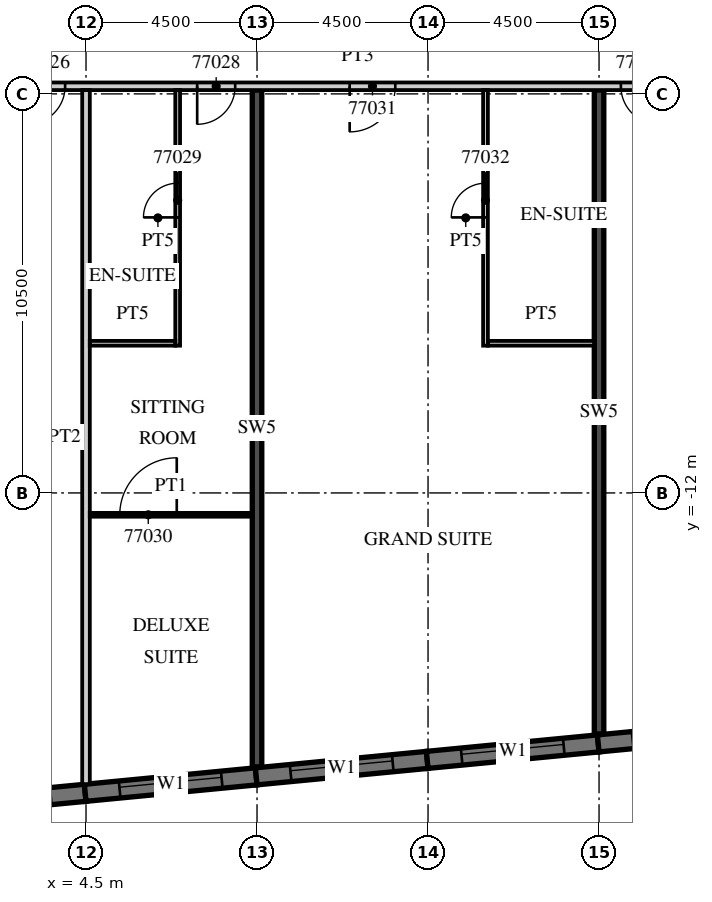
"""IFC4 building model, lengths in metres.
Left out: names, types, materials, properties, quantities, classifications, styles, units other than length and angle.
Written with IfcOpenShell. Run it as: python <this file> out.ifc"""

import sys

from ifc_helpers import new_model, si_unit, direction, frame, frame_2d, origin, place, context, subcontext, project, spatial, rectangle, extrude, element, fill, save


model = new_model("IFC4")
c1 = context("Model", 3, precision=1e-05, world=origin(), true_north=direction((0.0, 1.0)))
c2 = subcontext(c1, "Body", "Model", "MODEL_VIEW")
j1 = project(units=[si_unit("LENGTHUNIT", "METRE"), si_unit("PLANEANGLEUNIT", "RADIAN")], contexts=[c1])
p1 = place(None, origin())
s1 = spatial("IfcSite", under=j1, at=p1, CompositionType="ELEMENT")
p2 = place(p1, origin())
s2 = spatial("IfcBuilding", under=s1, at=p2, CompositionType="ELEMENT")
p3 = place(p2, frame((0.0, 0.0, 304.8)))
s3 = spatial("IfcBuildingStorey", under=s2, at=p3, CompositionType="ELEMENT", Elevation=304.8)
p4 = place(p3, frame((9.0, -19.207, 0.0), z_axis=(0.0, 0.0, 1.0), x_axis=(0.0, 1.0, 0.0)))
e1 = element("IfcWall", 1, at=p4, inside=s3, PredefinedType="SHEAR", context=c2, shape_type="SweptSolid", body=[
    extrude(rectangle(XDim=17.807, YDim=0.25, at=frame_2d((8.904, 0.0))), origin(), (0.0, 0.0, 1.0), 3.3),
])
p5 = place(p3, frame((18.0, -18.341, 0.0), z_axis=(0.0, 0.0, 1.0), x_axis=(0.0, 1.0, 0.0)))
e2 = element("IfcWall", 2, at=p5, inside=s3, PredefinedType="SHEAR", context=c2, shape_type="SweptSolid", body=[
    extrude(rectangle(XDim=16.941, YDim=0.25, at=frame_2d((8.47, 0.0))), origin(), (0.0, 0.0, 1.0), 3.3),
])
p6 = place(p3, frame((-0.021, -20.324, 0.0), z_axis=(0.0, 0.0, 1.0), x_axis=(0.995400317863, 0.09580296028, 0.0)))
e3 = element("IfcWall", 3, at=p6, inside=s3, PredefinedType="SOLIDWALL", context=c2, shape_type="SweptSolid", body=[
    extrude(rectangle(XDim=4.521, YDim=0.45, at=frame_2d((2.26, 0.0))), origin(), (0.0, 0.0, 1.0), 2.9),
])
p7 = place(p6, frame((0.91, 0.0, 0.45)))
e4 = element("IfcOpeningElement", 4, at=p7, cuts=e3, PredefinedType="OPENING", context=c2, shape_type="SweptSolid", body=[
    extrude(rectangle(XDim=2.7, YDim=2.25, at=frame_2d((1.35, 1.125))), frame((0.0, 0.235, 0.0), z_axis=(0.0, -1.0, 0.0), x_axis=(1.0, 0.0, 0.0)), (0.0, 0.0, 1.0), 0.47),
])
p8 = place(p3, frame((4.479, -19.891, 0.0), z_axis=(0.0, 0.0, 1.0), x_axis=(0.995394670263, 0.095861621166, 0.0)))
e5 = element("IfcWall", 5, at=p8, inside=s3, PredefinedType="SOLIDWALL", context=c2, shape_type="SweptSolid", body=[
    extrude(rectangle(XDim=4.521, YDim=0.45, at=frame_2d((2.26, 0.0))), origin(), (0.0, 0.0, 1.0), 2.9),
])
p9 = place(p8, frame((0.91, 0.0, 0.45)))
e6 = element("IfcOpeningElement", 6, at=p9, cuts=e5, PredefinedType="OPENING", context=c2, shape_type="SweptSolid", body=[
    extrude(rectangle(XDim=2.7, YDim=2.25, at=frame_2d((1.35, 1.125))), frame((0.0, 0.235, 0.0), z_axis=(0.0, -1.0, 0.0), x_axis=(1.0, 0.0, 0.0)), (0.0, 0.0, 1.0), 0.47),
])
p10 = place(p3, frame((8.978, -19.458, 0.0), z_axis=(0.0, 0.0, 1.0), x_axis=(0.995395166513, 0.095856468129, 0.0)))
e7 = element("IfcWall", 7, at=p10, inside=s3, PredefinedType="SOLIDWALL", context=c2, shape_type="SweptSolid", body=[
    extrude(rectangle(XDim=4.521, YDim=0.45, at=frame_2d((2.26, 0.0))), origin(), (0.0, 0.0, 1.0), 2.9),
])
p11 = place(p10, frame((0.91, 0.0, 0.45)))
e8 = element("IfcOpeningElement", 8, at=p11, cuts=e7, PredefinedType="OPENING", context=c2, shape_type="SweptSolid", body=[
    extrude(rectangle(XDim=2.7, YDim=2.25, at=frame_2d((1.35, 1.125))), frame((0.0, 0.235, 0.0), z_axis=(0.0, -1.0, 0.0), x_axis=(1.0, 0.0, 0.0)), (0.0, 0.0, 1.0), 0.47),
])
p12 = place(p3, frame((13.478, -19.024, 0.0), z_axis=(0.0, 0.0, 1.0), x_axis=(0.995395662684, 0.095851315644, 0.0)))
e9 = element("IfcWall", 9, at=p12, inside=s3, PredefinedType="SOLIDWALL", context=c2, shape_type="SweptSolid", body=[
    extrude(rectangle(XDim=4.521, YDim=0.45, at=frame_2d((2.26, 0.0))), origin(), (0.0, 0.0, 1.0), 2.9),
])
p13 = place(p12, frame((0.91, 0.0, 0.45)))
e10 = element("IfcOpeningElement", 10, at=p13, cuts=e9, PredefinedType="OPENING", context=c2, shape_type="SweptSolid", body=[
    extrude(rectangle(XDim=2.7, YDim=2.25, at=frame_2d((1.35, 1.125))), frame((0.0, 0.235, 0.0), z_axis=(0.0, -1.0, 0.0), x_axis=(1.0, 0.0, 0.0)), (0.0, 0.0, 1.0), 0.47),
])
p14 = place(p3, frame((17.979, -18.591, 0.0), z_axis=(0.0, 0.0, 1.0), x_axis=(0.995395166513, 0.095856468129, 0.0)))
e11 = element("IfcWall", 11, at=p14, inside=s3, PredefinedType="SOLIDWALL", context=c2, shape_type="SweptSolid", body=[
    extrude(rectangle(XDim=4.521, YDim=0.45, at=frame_2d((2.26, 0.0))), origin(), (0.0, 0.0, 1.0), 2.9),
])
p15 = place(p14, frame((0.91, 0.0, 0.45)))
e12 = element("IfcOpeningElement", 12, at=p15, cuts=e11, PredefinedType="OPENING", context=c2, shape_type="SweptSolid", body=[
    extrude(rectangle(XDim=2.7, YDim=2.25, at=frame_2d((1.35, 1.125))), frame((0.0, 0.235, 0.0), z_axis=(0.0, -1.0, 0.0), x_axis=(1.0, 0.0, 0.0)), (0.0, 0.0, 1.0), 0.47),
])
p16 = place(p3, frame((-13.5, -1.3, 0.0), z_axis=(0.0, 0.0, 1.0), x_axis=(1.0, 0.0, 0.0)))
e13 = element("IfcWall", 13, at=p16, inside=s3, PredefinedType="PARTITIONING", context=c2, shape_type="SweptSolid", body=[
    extrude(rectangle(XDim=50.293, YDim=0.2, at=frame_2d((25.146, 0.0))), origin(), (0.0, 0.0, 1.0), 2.9),
])
p17 = place(p16, frame((0.575, 0.0, 0.0)))
e14 = element("IfcOpeningElement", 14, at=p17, cuts=e13, PredefinedType="OPENING", context=c2, shape_type="SweptSolid", body=[
    extrude(rectangle(XDim=1.0, YDim=2.1, at=frame_2d((0.5, 1.05))), frame((0.0, 0.11, 0.0), z_axis=(0.0, -1.0, 0.0), x_axis=(1.0, 0.0, 0.0)), (0.0, 0.0, 1.0), 0.22),
])
p18 = place(p16, frame((6.938, 0.0, 0.0)))
e15 = element("IfcOpeningElement", 15, at=p18, cuts=e13, PredefinedType="OPENING", context=c2, shape_type="SweptSolid", body=[
    extrude(rectangle(XDim=1.2, YDim=2.1, at=frame_2d((0.6, 1.05))), frame((0.0, 0.11, 0.0), z_axis=(0.0, -1.0, 0.0), x_axis=(1.0, 0.0, 0.0)), (0.0, 0.0, 1.0), 0.22),
])
p19 = place(p16, frame((16.45, 0.0, 0.0)))
e16 = element("IfcOpeningElement", 16, at=p19, cuts=e13, PredefinedType="OPENING", context=c2, shape_type="SweptSolid", body=[
    extrude(rectangle(XDim=1.0, YDim=2.1, at=frame_2d((0.5, 1.05))), frame((0.0, 0.11, 0.0), z_axis=(0.0, -1.0, 0.0), x_axis=(1.0, 0.0, 0.0)), (0.0, 0.0, 1.0), 0.22),
])
p20 = place(p16, frame((20.925, 0.0, 0.0)))
e17 = element("IfcOpeningElement", 17, at=p20, cuts=e13, PredefinedType="OPENING", context=c2, shape_type="SweptSolid", body=[
    extrude(rectangle(XDim=1.0, YDim=2.1, at=frame_2d((0.5, 1.05))), frame((0.0, 0.11, 0.0), z_axis=(0.0, -1.0, 0.0), x_axis=(1.0, 0.0, 0.0)), (0.0, 0.0, 1.0), 0.22),
])
p21 = place(p16, frame((24.938, 0.0, 0.0)))
e18 = element("IfcOpeningElement", 18, at=p21, cuts=e13, PredefinedType="OPENING", context=c2, shape_type="SweptSolid", body=[
    extrude(rectangle(XDim=1.2, YDim=2.1, at=frame_2d((0.6, 1.05))), frame((0.0, 0.11, 0.0), z_axis=(0.0, -1.0, 0.0), x_axis=(1.0, 0.0, 0.0)), (0.0, 0.0, 1.0), 0.22),
])
p22 = place(p16, frame((32.075, 0.0, 0.0)))
e19 = element("IfcOpeningElement", 19, at=p22, cuts=e13, PredefinedType="OPENING", context=c2, shape_type="SweptSolid", body=[
    extrude(rectangle(XDim=1.0, YDim=2.1, at=frame_2d((0.5, 1.05))), frame((0.0, 0.11, 0.0), z_axis=(0.0, -1.0, 0.0), x_axis=(1.0, 0.0, 0.0)), (0.0, 0.0, 1.0), 0.22),
])
p23 = place(p16, frame((38.925, 0.0, 0.0)))
e20 = element("IfcOpeningElement", 20, at=p23, cuts=e13, PredefinedType="OPENING", context=c2, shape_type="SweptSolid", body=[
    extrude(rectangle(XDim=1.0, YDim=2.1, at=frame_2d((0.5, 1.05))), frame((0.0, 0.11, 0.0), z_axis=(0.0, -1.0, 0.0), x_axis=(1.0, 0.0, 0.0)), (0.0, 0.0, 1.0), 0.22),
])
p24 = place(p16, frame((45.862, 0.0, 0.0)))
e21 = element("IfcOpeningElement", 21, at=p24, cuts=e13, PredefinedType="OPENING", context=c2, shape_type="SweptSolid", body=[
    extrude(rectangle(XDim=1.2, YDim=2.1, at=frame_2d((0.6, 1.05))), frame((0.0, 0.11, 0.0), z_axis=(0.0, -1.0, 0.0), x_axis=(1.0, 0.0, 0.0)), (0.0, 0.0, 1.0), 0.22),
])
p25 = place(p3, frame((4.5, -19.663, 0.0), z_axis=(0.0, 0.0, 1.0), x_axis=(0.0, 1.0, 0.0)))
e22 = element("IfcWall", 22, at=p25, inside=s3, PredefinedType="PARTITIONING", context=c2, shape_type="SweptSolid", body=[
    extrude(rectangle(XDim=18.263, YDim=0.2, at=frame_2d((9.132, 0.0))), origin(), (0.0, 0.0, 1.0), 2.9),
])
p26 = place(p3, frame((6.912, -8.125, 0.0), z_axis=(0.0, 0.0, 1.0), x_axis=(0.0, 1.0, 0.0)))
e23 = element("IfcWall", 23, at=p26, inside=s3, PredefinedType="PARTITIONING", context=c2, shape_type="SweptSolid", body=[
    extrude(rectangle(XDim=6.725, YDim=0.125, at=frame_2d((3.363, 0.0))), origin(), (0.0, 0.0, 1.0), 2.9),
])
p27 = place(p26, frame((3.375, 0.0, 0.0)))
e24 = element("IfcOpeningElement", 24, at=p27, cuts=e23, PredefinedType="OPENING", context=c2, shape_type="SweptSolid", body=[
    extrude(rectangle(XDim=0.9, YDim=2.1, at=frame_2d((0.45, 1.05))), frame((0.0, 0.073, 0.0), z_axis=(0.0, -1.0, 0.0), x_axis=(1.0, 0.0, 0.0)), (0.0, 0.0, 1.0), 0.145),
])
p28 = place(p3, frame((4.6, -8.062, 0.0), z_axis=(0.0, 0.0, 1.0), x_axis=(1.0, 0.0, 0.0)))
e25 = element("IfcWall", 25, at=p28, inside=s3, PredefinedType="PARTITIONING", context=c2, shape_type="SweptSolid", body=[
    extrude(rectangle(XDim=2.25, YDim=0.125, at=frame_2d((1.125, 0.0))), origin(), (0.0, 0.0, 1.0), 2.9),
])
p29 = place(p3, frame((4.6, -12.575, 0.0), z_axis=(0.0, 0.0, 1.0), x_axis=(1.0, 0.0, 0.0)))
e26 = element("IfcWall", 26, at=p29, inside=s3, PredefinedType="PARTITIONING", context=c2, shape_type="SweptSolid", body=[
    extrude(rectangle(XDim=4.275, YDim=0.1, at=frame_2d((2.137, 0.0))), origin(), (0.0, 0.0, 1.0), 2.9),
])
p30 = place(p29, frame((0.788, 0.0, 0.0)))
e27 = element("IfcOpeningElement", 27, at=p30, cuts=e26, PredefinedType="OPENING", context=c2, shape_type="SweptSolid", body=[
    extrude(rectangle(XDim=1.5, YDim=2.1, at=frame_2d((0.75, 1.05))), frame((0.0, 0.06, 0.0), z_axis=(0.0, -1.0, 0.0), x_axis=(1.0, 0.0, 0.0)), (0.0, 0.0, 1.0), 0.12),
])
p31 = place(p3, frame((15.012, -8.125, 0.0), z_axis=(0.0, 0.0, 1.0), x_axis=(0.0, 1.0, 0.0)))
e28 = element("IfcWall", 28, at=p31, inside=s3, PredefinedType="PARTITIONING", context=c2, shape_type="SweptSolid", body=[
    extrude(rectangle(XDim=6.725, YDim=0.125, at=frame_2d((3.363, 0.0))), origin(), (0.0, 0.0, 1.0), 2.9),
])
p32 = place(p31, frame((3.375, 0.0, 0.0)))
e29 = element("IfcOpeningElement", 29, at=p32, cuts=e28, PredefinedType="OPENING", context=c2, shape_type="SweptSolid", body=[
    extrude(rectangle(XDim=0.9, YDim=2.1, at=frame_2d((0.45, 1.05))), frame((0.0, 0.073, 0.0), z_axis=(0.0, -1.0, 0.0), x_axis=(1.0, 0.0, 0.0)), (0.0, 0.0, 1.0), 0.145),
])
p33 = place(p3, frame((15.075, -8.062, 0.0), z_axis=(0.0, 0.0, 1.0), x_axis=(1.0, 0.0, 0.0)))
e30 = element("IfcWall", 30, at=p33, inside=s3, PredefinedType="PARTITIONING", context=c2, shape_type="SweptSolid", body=[
    extrude(rectangle(XDim=2.8, YDim=0.125, at=frame_2d((1.4, 0.0))), origin(), (0.0, 0.0, 1.0), 2.9),
])
p34 = place(p9, origin())
e31 = element("IfcWindow", 31, at=p34, inside=s3, PartitioningType="SINGLE_PANEL", PredefinedType="WINDOW", context=c2, shape_type="SweptSolid", body=[
    extrude(rectangle(XDim=2.7, YDim=2.25, at=frame_2d((1.35, 1.125))), frame((0.0, 0.09, 0.0), z_axis=(0.0, -1.0, 0.0), x_axis=(1.0, 0.0, 0.0)), (0.0, 0.0, 1.0), 0.06),
])
fill(e6, e31)
p35 = place(p11, origin())
e32 = element("IfcWindow", 32, at=p35, inside=s3, PartitioningType="SINGLE_PANEL", PredefinedType="WINDOW", context=c2, shape_type="SweptSolid", body=[
    extrude(rectangle(XDim=2.7, YDim=2.25, at=frame_2d((1.35, 1.125))), frame((0.0, 0.09, 0.0), z_axis=(0.0, -1.0, 0.0), x_axis=(1.0, 0.0, 0.0)), (0.0, 0.0, 1.0), 0.06),
])
fill(e8, e32)
p36 = place(p13, origin())
e33 = element("IfcWindow", 33, at=p36, inside=s3, PartitioningType="SINGLE_PANEL", PredefinedType="WINDOW", context=c2, shape_type="SweptSolid", body=[
    extrude(rectangle(XDim=2.7, YDim=2.25, at=frame_2d((1.35, 1.125))), frame((0.0, 0.09, 0.0), z_axis=(0.0, -1.0, 0.0), x_axis=(1.0, 0.0, 0.0)), (0.0, 0.0, 1.0), 0.06),
])
fill(e10, e33)
p37 = place(p19, origin())
e34 = element("IfcDoor", 34, at=p37, inside=s3, OperationType="SINGLE_SWING_LEFT", PredefinedType="DOOR", context=c2, shape_type="SweptSolid", body=[
    extrude(rectangle(XDim=1.0, YDim=2.1, at=frame_2d((0.5, 1.05))), frame((0.0, 0.025, 0.0), z_axis=(0.0, -1.0, 0.0), x_axis=(1.0, 0.0, 0.0)), (0.0, 0.0, 1.0), 0.05),
])
fill(e16, e34)
p38 = place(p20, origin())
e35 = element("IfcDoor", 35, at=p38, inside=s3, OperationType="SINGLE_SWING_LEFT", PredefinedType="DOOR", context=c2, shape_type="SweptSolid", body=[
    extrude(rectangle(XDim=1.0, YDim=2.1, at=frame_2d((0.5, 1.05))), frame((0.0, 0.025, 0.0), z_axis=(0.0, -1.0, 0.0), x_axis=(1.0, 0.0, 0.0)), (0.0, 0.0, 1.0), 0.05),
])
fill(e17, e35)
p39 = place(p27, origin())
e36 = element("IfcDoor", 36, at=p39, inside=s3, OperationType="SINGLE_SWING_LEFT", PredefinedType="DOOR", context=c2, shape_type="SweptSolid", body=[
    extrude(rectangle(XDim=0.9, YDim=2.1, at=frame_2d((0.45, 1.05))), frame((0.0, 0.025, 0.0), z_axis=(0.0, -1.0, 0.0), x_axis=(1.0, 0.0, 0.0)), (0.0, 0.0, 1.0), 0.05),
])
fill(e24, e36)
p40 = place(p30, origin())
e37 = element("IfcDoor", 37, at=p40, inside=s3, OperationType="SINGLE_SWING_RIGHT", PredefinedType="DOOR", context=c2, shape_type="SweptSolid", body=[
    extrude(rectangle(XDim=1.5, YDim=2.1, at=frame_2d((0.75, 1.05))), frame((0.0, 0.025, 0.0), z_axis=(0.0, -1.0, 0.0), x_axis=(1.0, 0.0, 0.0)), (0.0, 0.0, 1.0), 0.05),
])
fill(e27, e37)
p41 = place(p21, origin())
e38 = element("IfcDoor", 38, at=p41, inside=s3, OperationType="SINGLE_SWING_LEFT", PredefinedType="DOOR", context=c2, shape_type="SweptSolid", body=[
    extrude(rectangle(XDim=1.2, YDim=2.1, at=frame_2d((0.6, 1.05))), frame((0.0, 0.025, 0.0), z_axis=(0.0, -1.0, 0.0), x_axis=(1.0, 0.0, 0.0)), (0.0, 0.0, 1.0), 0.05),
])
fill(e18, e38)
p42 = place(p32, origin())
e39 = element("IfcDoor", 39, at=p42, inside=s3, OperationType="SINGLE_SWING_LEFT", PredefinedType="DOOR", context=c2, shape_type="SweptSolid", body=[
    extrude(rectangle(XDim=0.9, YDim=2.1, at=frame_2d((0.45, 1.05))), frame((0.0, 0.025, 0.0), z_axis=(0.0, -1.0, 0.0), x_axis=(1.0, 0.0, 0.0)), (0.0, 0.0, 1.0), 0.05),
])
fill(e29, e39)
p43 = place(p22, origin())
e40 = element("IfcDoor", 40, at=p43, inside=s3, OperationType="SINGLE_SWING_RIGHT", PredefinedType="DOOR", context=c2, shape_type="SweptSolid", body=[
    extrude(rectangle(XDim=1.0, YDim=2.1, at=frame_2d((0.5, 1.05))), frame((0.0, 0.025, 0.0), z_axis=(0.0, -1.0, 0.0), x_axis=(1.0, 0.0, 0.0)), (0.0, 0.0, 1.0), 0.05),
])
fill(e19, e40)
save(model, sys.argv[1])
